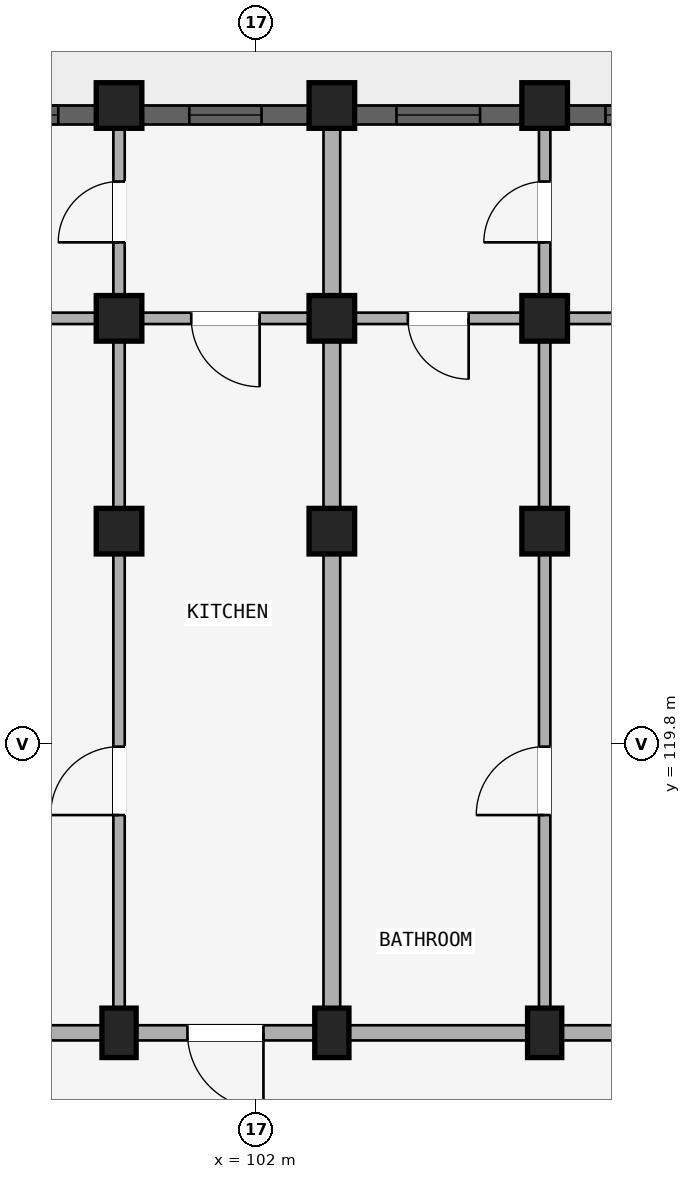
"""IFC4 building model, lengths in metres.
Left out: names, types, materials, properties, quantities, classifications, styles, units other than length and angle.
Written with IfcOpenShell. Run it as: python <this file> out.ifc"""

import sys

from ifc_helpers import new_model, si_unit, direction, frame, frame_2d, origin, origin_2d, place, context, subcontext, project, spatial, rectangle, extrude, element, fill, save


model = new_model("IFC4")
c1 = context("Model", 3, precision=1e-05, world=origin(), true_north=direction((0.0, 1.0)))
c2 = subcontext(c1, "Body", "Model", "MODEL_VIEW")
j1 = project(units=[si_unit("LENGTHUNIT", "METRE"), si_unit("PLANEANGLEUNIT", "RADIAN")], contexts=[c1])
p1 = place(None, origin())
s1 = spatial("IfcSite", under=j1, at=p1, CompositionType="ELEMENT")
p2 = place(p1, origin())
s2 = spatial("IfcBuilding", under=s1, at=p2, CompositionType="ELEMENT")
p3 = place(p2, frame((0.0, 0.0, 33.9)))
s3 = spatial("IfcBuildingStorey", under=s2, at=p3, CompositionType="ELEMENT", Elevation=33.9)
p4 = place(p3, frame((105.8, 116.0, 0.0), z_axis=(0.0, 0.0, 1.0), x_axis=(1.0, 0.0, 0.0)))
e1 = element("IfcColumn", 1, at=p4, inside=s3, PredefinedType="COLUMN", context=c2, shape_type="SweptSolid", body=[
    extrude(rectangle(XDim=0.45, YDim=0.65, at=origin_2d()), origin(), (0.0, 0.0, 1.0), 2.93),
])
for number, where, z_axis, x_axis in (
    (2, (105.8, 122.6, 0.0), (0.0, 0.0, 1.0), (1.0, 0.0, 0.0)),
    (3, (105.8, 125.4, 0.0), (0.0, 0.0, 1.0), (1.0, 0.0, 0.0)),
):
    element("IfcColumn", number, at=place(p3, frame(where, z_axis=z_axis, x_axis=x_axis)), inside=s3, PredefinedType="COLUMN", context=c2, shape_type="SweptSolid", body=[
        extrude(rectangle(XDim=0.6, YDim=0.6, at=origin_2d()), origin(), (0.0, 0.0, 1.0), 2.93),
    ])
p5 = place(p3, frame((105.8, 128.2, 0.0), z_axis=(0.0, 0.0, 1.0), x_axis=(1.0, 0.0, 0.0)))
e4 = element("IfcColumn", 4, at=p5, inside=s3, PredefinedType="COLUMN", context=c2, shape_type="SweptSolid", body=[
    extrude(rectangle(XDim=0.6, YDim=0.6, at=origin_2d()), origin(), (0.0, 0.0, 1.0), 2.97),
])
p6 = place(p3, frame((103.0, 116.0, 0.0), z_axis=(0.0, 0.0, 1.0), x_axis=(1.0, 0.0, 0.0)))
e5 = element("IfcColumn", 5, at=p6, inside=s3, PredefinedType="COLUMN", context=c2, shape_type="SweptSolid", body=[
    extrude(rectangle(XDim=0.45, YDim=0.65, at=origin_2d()), origin(), (0.0, 0.0, 1.0), 2.93),
])
for number, where, z_axis, x_axis in (
    (6, (103.0, 122.6, 0.0), (0.0, 0.0, 1.0), (1.0, 0.0, 0.0)),
    (7, (103.0, 125.4, 0.0), (0.0, 0.0, 1.0), (1.0, 0.0, 0.0)),
):
    element("IfcColumn", number, at=place(p3, frame(where, z_axis=z_axis, x_axis=x_axis)), inside=s3, PredefinedType="COLUMN", context=c2, shape_type="SweptSolid", body=[
        extrude(rectangle(XDim=0.6, YDim=0.6, at=origin_2d()), origin(), (0.0, 0.0, 1.0), 2.93),
    ])
p7 = place(p3, frame((103.0, 128.2, 0.0), z_axis=(0.0, 0.0, 1.0), x_axis=(1.0, 0.0, 0.0)))
e8 = element("IfcColumn", 8, at=p7, inside=s3, PredefinedType="COLUMN", context=c2, shape_type="SweptSolid", body=[
    extrude(rectangle(XDim=0.6, YDim=0.6, at=origin_2d()), origin(), (0.0, 0.0, 1.0), 2.97),
])
p8 = place(p3, frame((100.2, 116.0, 0.0), z_axis=(0.0, 0.0, 1.0), x_axis=(1.0, 0.0, 0.0)))
e9 = element("IfcColumn", 9, at=p8, inside=s3, PredefinedType="COLUMN", context=c2, shape_type="SweptSolid", body=[
    extrude(rectangle(XDim=0.45, YDim=0.65, at=origin_2d()), origin(), (0.0, 0.0, 1.0), 2.93),
])
for number, where, z_axis, x_axis in (
    (10, (100.2, 122.6, 0.0), (0.0, 0.0, 1.0), (1.0, 0.0, 0.0)),
    (11, (100.2, 125.4, 0.0), (0.0, 0.0, 1.0), (1.0, 0.0, 0.0)),
):
    element("IfcColumn", number, at=place(p3, frame(where, z_axis=z_axis, x_axis=x_axis)), inside=s3, PredefinedType="COLUMN", context=c2, shape_type="SweptSolid", body=[
        extrude(rectangle(XDim=0.6, YDim=0.6, at=origin_2d()), origin(), (0.0, 0.0, 1.0), 2.93),
    ])
p9 = place(p3, frame((100.2, 128.2, 0.0), z_axis=(0.0, 0.0, 1.0), x_axis=(1.0, 0.0, 0.0)))
e12 = element("IfcColumn", 12, at=p9, inside=s3, PredefinedType="COLUMN", context=c2, shape_type="SweptSolid", body=[
    extrude(rectangle(XDim=0.6, YDim=0.6, at=origin_2d()), origin(), (0.0, 0.0, 1.0), 2.97),
])
p10 = place(p3, frame((108.6, 116.0, 0.0), z_axis=(0.0, 0.0, 1.0), x_axis=(-1.0, 0.0, 0.0)))
e13 = element("IfcWall", 13, at=p10, inside=s3, PredefinedType="STANDARD", context=c2, shape_type="SweptSolid", body=[
    extrude(rectangle(XDim=2.8, YDim=0.2, at=frame_2d((1.4, 0.0))), origin(), (0.0, 0.0, 1.0), 2.372),
])
p11 = place(p10, frame((0.9, 0.0, 0.0)))
e14 = element("IfcOpeningElement", 14, at=p11, cuts=e13, PredefinedType="OPENING", context=c2, shape_type="SweptSolid", body=[
    extrude(rectangle(XDim=1.0, YDim=2.15, at=frame_2d((0.5, 1.075))), frame((0.0, 0.11, 0.0), z_axis=(0.0, -1.0, 0.0), x_axis=(1.0, 0.0, 0.0)), (0.0, 0.0, 1.0), 0.22),
])
p12 = place(p3, frame((108.52, 125.4, 0.0), z_axis=(0.0, 0.0, 1.0), x_axis=(-1.0, 0.0, 0.0)))
e15 = element("IfcWall", 15, at=p12, inside=s3, PredefinedType="PLUMBINGWALL", context=c2, shape_type="SweptSolid", body=[
    extrude(rectangle(XDim=2.64, YDim=0.15, at=frame_2d((1.32, 0.0))), origin(), (0.0, 0.0, 1.0), 2.372),
])
p13 = place(p12, frame((0.87, 0.0, 0.0)))
e16 = element("IfcOpeningElement", 16, at=p13, cuts=e15, PredefinedType="OPENING", context=c2, shape_type="SweptSolid", body=[
    extrude(rectangle(XDim=0.9, YDim=2.1, at=frame_2d((0.45, 1.05))), frame((0.0, 0.085, 0.0), z_axis=(0.0, -1.0, 0.0), x_axis=(1.0, 0.0, 0.0)), (0.0, 0.0, 1.0), 0.17),
])
p14 = place(p3, frame((105.8, 116.0, 0.0), z_axis=(0.0, 0.0, 1.0), x_axis=(-1.0, 0.0, 0.0)))
e17 = element("IfcWall", 17, at=p14, inside=s3, PredefinedType="STANDARD", context=c2, shape_type="SweptSolid", body=[
    extrude(rectangle(XDim=2.8, YDim=0.2, at=frame_2d((1.4, 0.0))), origin(), (0.0, 0.0, 1.0), 2.372),
])
p15 = place(p3, frame((105.72, 125.4, 0.0), z_axis=(0.0, 0.0, 1.0), x_axis=(-1.0, 0.0, 0.0)))
e18 = element("IfcWall", 18, at=p15, inside=s3, PredefinedType="PLUMBINGWALL", context=c2, shape_type="SweptSolid", body=[
    extrude(rectangle(XDim=2.64, YDim=0.15, at=frame_2d((1.32, 0.0))), origin(), (0.0, 0.0, 1.0), 2.372),
])
p16 = place(p15, frame((0.92, 0.0, 0.0)))
e19 = element("IfcOpeningElement", 19, at=p16, cuts=e18, PredefinedType="OPENING", context=c2, shape_type="SweptSolid", body=[
    extrude(rectangle(XDim=0.8, YDim=2.1, at=frame_2d((0.4, 1.05))), frame((0.0, 0.085, 0.0), z_axis=(0.0, -1.0, 0.0), x_axis=(1.0, 0.0, 0.0)), (0.0, 0.0, 1.0), 0.17),
])
p17 = place(p3, frame((103.0, 116.0, 0.0), z_axis=(0.0, 0.0, 1.0), x_axis=(-1.0, 0.0, 0.0)))
e20 = element("IfcWall", 20, at=p17, inside=s3, PredefinedType="STANDARD", context=c2, shape_type="SweptSolid", body=[
    extrude(rectangle(XDim=2.8, YDim=0.2, at=frame_2d((1.4, 0.0))), origin(), (0.0, 0.0, 1.0), 2.372),
])
p18 = place(p17, frame((0.9, 0.0, 0.0)))
e21 = element("IfcOpeningElement", 21, at=p18, cuts=e20, PredefinedType="OPENING", context=c2, shape_type="SweptSolid", body=[
    extrude(rectangle(XDim=1.0, YDim=2.15, at=frame_2d((0.5, 1.075))), frame((0.0, 0.11, 0.0), z_axis=(0.0, -1.0, 0.0), x_axis=(1.0, 0.0, 0.0)), (0.0, 0.0, 1.0), 0.22),
])
p19 = place(p3, frame((102.92, 125.4, 0.0), z_axis=(0.0, 0.0, 1.0), x_axis=(-1.0, 0.0, 0.0)))
e22 = element("IfcWall", 22, at=p19, inside=s3, PredefinedType="PLUMBINGWALL", context=c2, shape_type="SweptSolid", body=[
    extrude(rectangle(XDim=2.64, YDim=0.15, at=frame_2d((1.32, 0.0))), origin(), (0.0, 0.0, 1.0), 2.372),
])
p20 = place(p19, frame((0.87, 0.0, 0.0)))
e23 = element("IfcOpeningElement", 23, at=p20, cuts=e22, PredefinedType="OPENING", context=c2, shape_type="SweptSolid", body=[
    extrude(rectangle(XDim=0.9, YDim=2.1, at=frame_2d((0.45, 1.05))), frame((0.0, 0.085, 0.0), z_axis=(0.0, -1.0, 0.0), x_axis=(1.0, 0.0, 0.0)), (0.0, 0.0, 1.0), 0.17),
])
p21 = place(p3, frame((100.2, 116.0, 0.0), z_axis=(0.0, 0.0, 1.0), x_axis=(-1.0, 0.0, 0.0)))
e24 = element("IfcWall", 24, at=p21, inside=s3, PredefinedType="STANDARD", context=c2, shape_type="SweptSolid", body=[
    extrude(rectangle(XDim=2.8, YDim=0.2, at=frame_2d((1.4, 0.0))), origin(), (0.0, 0.0, 1.0), 2.372),
])
p22 = place(p3, frame((100.12, 125.4, 0.0), z_axis=(0.0, 0.0, 1.0), x_axis=(-1.0, 0.0, 0.0)))
e25 = element("IfcWall", 25, at=p22, inside=s3, PredefinedType="PLUMBINGWALL", context=c2, shape_type="SweptSolid", body=[
    extrude(rectangle(XDim=2.64, YDim=0.15, at=frame_2d((1.32, 0.0))), origin(), (0.0, 0.0, 1.0), 2.372),
])
p23 = place(p22, frame((0.92, 0.0, 0.0)))
e26 = element("IfcOpeningElement", 26, at=p23, cuts=e25, PredefinedType="OPENING", context=c2, shape_type="SweptSolid", body=[
    extrude(rectangle(XDim=0.8, YDim=2.1, at=frame_2d((0.4, 1.05))), frame((0.0, 0.085, 0.0), z_axis=(0.0, -1.0, 0.0), x_axis=(1.0, 0.0, 0.0)), (0.0, 0.0, 1.0), 0.17),
])
p24 = place(p3, frame((105.8, 116.05, 0.0), z_axis=(0.0, 0.0, 1.0), x_axis=(0.0, 1.0, 0.0)))
e27 = element("IfcWall", 27, at=p24, inside=s3, PredefinedType="PARTITIONING", context=c2, shape_type="SweptSolid", body=[
    extrude(rectangle(XDim=6.53, YDim=0.15, at=frame_2d((3.265, 0.0))), origin(), (0.0, 0.0, 1.0), 2.372),
])
p25 = place(p24, frame((2.815, 0.0, 0.0)))
e28 = element("IfcOpeningElement", 28, at=p25, cuts=e27, PredefinedType="OPENING", context=c2, shape_type="SweptSolid", body=[
    extrude(rectangle(XDim=0.9, YDim=2.1, at=frame_2d((0.45, 1.05))), frame((0.0, 0.085, 0.0), z_axis=(0.0, -1.0, 0.0), x_axis=(1.0, 0.0, 0.0)), (0.0, 0.0, 1.0), 0.17),
])
p26 = place(p3, frame((105.8, 122.7, 0.0), z_axis=(0.0, 0.0, 1.0), x_axis=(0.0, 1.0, 0.0)))
e29 = element("IfcWall", 29, at=p26, inside=s3, PredefinedType="PARTITIONING", context=c2, shape_type="SweptSolid", body=[
    extrude(rectangle(XDim=5.22, YDim=0.15, at=frame_2d((2.61, 0.0))), origin(), (0.0, 0.0, 1.0), 2.372),
])
p27 = place(p26, frame((3.7, 0.0, 0.0)))
e30 = element("IfcOpeningElement", 30, at=p27, cuts=e29, PredefinedType="OPENING", context=c2, shape_type="SweptSolid", body=[
    extrude(rectangle(XDim=0.8, YDim=2.1, at=frame_2d((0.4, 1.05))), frame((0.0, 0.085, 0.0), z_axis=(0.0, -1.0, 0.0), x_axis=(1.0, 0.0, 0.0)), (0.0, 0.0, 1.0), 0.17),
])
p28 = place(p3, frame((103.0, 116.05, 0.0), z_axis=(0.0, 0.0, 1.0), x_axis=(0.0, 1.0, 0.0)))
e31 = element("IfcWall", 31, at=p28, inside=s3, PredefinedType="STANDARD", context=c2, shape_type="SweptSolid", body=[
    extrude(rectangle(XDim=6.53, YDim=0.22, at=frame_2d((3.265, 0.0))), origin(), (0.0, 0.0, 1.0), 2.372),
])
p29 = place(p3, frame((103.0, 122.7, 0.0), z_axis=(0.0, 0.0, 1.0), x_axis=(0.0, 1.0, 0.0)))
e32 = element("IfcWall", 32, at=p29, inside=s3, PredefinedType="STANDARD", context=c2, shape_type="SweptSolid", body=[
    extrude(rectangle(XDim=5.22, YDim=0.22, at=frame_2d((2.61, 0.0))), origin(), (0.0, 0.0, 1.0), 2.372),
])
p30 = place(p3, frame((100.2, 116.05, 0.0), z_axis=(0.0, 0.0, 1.0), x_axis=(0.0, 1.0, 0.0)))
e33 = element("IfcWall", 33, at=p30, inside=s3, PredefinedType="PARTITIONING", context=c2, shape_type="SweptSolid", body=[
    extrude(rectangle(XDim=6.53, YDim=0.15, at=frame_2d((3.265, 0.0))), origin(), (0.0, 0.0, 1.0), 2.372),
])
p31 = place(p30, frame((2.815, 0.0, 0.0)))
e34 = element("IfcOpeningElement", 34, at=p31, cuts=e33, PredefinedType="OPENING", context=c2, shape_type="SweptSolid", body=[
    extrude(rectangle(XDim=0.9, YDim=2.1, at=frame_2d((0.45, 1.05))), frame((0.0, 0.085, 0.0), z_axis=(0.0, -1.0, 0.0), x_axis=(1.0, 0.0, 0.0)), (0.0, 0.0, 1.0), 0.17),
])
p32 = place(p3, frame((100.2, 122.7, 0.0), z_axis=(0.0, 0.0, 1.0), x_axis=(0.0, 1.0, 0.0)))
e35 = element("IfcWall", 35, at=p32, inside=s3, PredefinedType="PARTITIONING", context=c2, shape_type="SweptSolid", body=[
    extrude(rectangle(XDim=5.22, YDim=0.15, at=frame_2d((2.61, 0.0))), origin(), (0.0, 0.0, 1.0), 2.372),
])
p33 = place(p32, frame((3.7, 0.0, 0.0)))
e36 = element("IfcOpeningElement", 36, at=p33, cuts=e35, PredefinedType="OPENING", context=c2, shape_type="SweptSolid", body=[
    extrude(rectangle(XDim=0.8, YDim=2.1, at=frame_2d((0.4, 1.05))), frame((0.0, 0.085, 0.0), z_axis=(0.0, -1.0, 0.0), x_axis=(1.0, 0.0, 0.0)), (0.0, 0.0, 1.0), 0.17),
])
p34 = place(p3, frame((108.296, 128.075, 0.0), z_axis=(0.0, 0.0, 1.0), x_axis=(-1.0, 0.0, 0.0)))
e37 = element("IfcWall", 37, at=p34, inside=s3, PredefinedType="STANDARD", context=c2, shape_type="SweptSolid", body=[
    extrude(rectangle(XDim=2.193, YDim=0.25, at=frame_2d((1.096, 0.0))), origin(), (0.0, 0.0, 1.0), 2.48),
])
p35 = place(p34, frame((0.497, 0.0, 0.78)))
e38 = element("IfcOpeningElement", 38, at=p35, cuts=e37, PredefinedType="OPENING", context=c2, shape_type="SweptSolid", body=[
    extrude(rectangle(XDim=1.2, YDim=1.5, at=frame_2d((0.6, 0.75))), frame((0.0, 0.135, 0.0), z_axis=(0.0, -1.0, 0.0), x_axis=(1.0, 0.0, 0.0)), (0.0, 0.0, 1.0), 0.27),
])
p36 = place(p3, frame((105.497, 128.075, 0.0), z_axis=(0.0, 0.0, 1.0), x_axis=(-1.0, 0.0, 0.0)))
e39 = element("IfcWall", 39, at=p36, inside=s3, PredefinedType="STANDARD", context=c2, shape_type="SweptSolid", body=[
    extrude(rectangle(XDim=2.193, YDim=0.25, at=frame_2d((1.097, 0.0))), origin(), (0.0, 0.0, 1.0), 2.48),
])
p37 = place(p36, frame((0.546, 0.0, 0.83)))
e40 = element("IfcOpeningElement", 40, at=p37, cuts=e39, PredefinedType="OPENING", context=c2, shape_type="SweptSolid", body=[
    extrude(rectangle(XDim=1.1, YDim=1.45, at=frame_2d((0.55, 0.725))), frame((0.0, 0.135, 0.0), z_axis=(0.0, -1.0, 0.0), x_axis=(1.0, 0.0, 0.0)), (0.0, 0.0, 1.0), 0.27),
])
p38 = place(p3, frame((102.697, 128.075, 0.0), z_axis=(0.0, 0.0, 1.0), x_axis=(-1.0, 0.0, 0.0)))
e41 = element("IfcWall", 41, at=p38, inside=s3, PredefinedType="STANDARD", context=c2, shape_type="SweptSolid", body=[
    extrude(rectangle(XDim=2.193, YDim=0.25, at=frame_2d((1.097, 0.0))), origin(), (0.0, 0.0, 1.0), 2.48),
])
p39 = place(p38, frame((0.622, 0.0, 0.88)))
e42 = element("IfcOpeningElement", 42, at=p39, cuts=e41, PredefinedType="OPENING", context=c2, shape_type="SweptSolid", body=[
    extrude(rectangle(XDim=0.95, YDim=1.35, at=frame_2d((0.475, 0.675))), frame((0.0, 0.135, 0.0), z_axis=(0.0, -1.0, 0.0), x_axis=(1.0, 0.0, 0.0)), (0.0, 0.0, 1.0), 0.27),
])
p40 = place(p3, frame((99.896, 128.075, 0.0), z_axis=(0.0, 0.0, 1.0), x_axis=(-1.0, 0.0, 0.0)))
e43 = element("IfcWall", 43, at=p40, inside=s3, PredefinedType="STANDARD", context=c2, shape_type="SweptSolid", body=[
    extrude(rectangle(XDim=2.193, YDim=0.25, at=frame_2d((1.096, 0.0))), origin(), (0.0, 0.0, 1.0), 2.48),
])
p41 = place(p40, frame((0.497, 0.0, 0.78)))
e44 = element("IfcOpeningElement", 44, at=p41, cuts=e43, PredefinedType="OPENING", context=c2, shape_type="SweptSolid", body=[
    extrude(rectangle(XDim=1.2, YDim=1.5, at=frame_2d((0.6, 0.75))), frame((0.0, 0.135, 0.0), z_axis=(0.0, -1.0, 0.0), x_axis=(1.0, 0.0, 0.0)), (0.0, 0.0, 1.0), 0.27),
])
p42 = place(p35, origin())
e45 = element("IfcWindow", 45, at=p42, inside=s3, PartitioningType="SINGLE_PANEL", PredefinedType="WINDOW", context=c2, shape_type="SweptSolid", body=[
    extrude(rectangle(XDim=1.2, YDim=1.5, at=frame_2d((0.6, 0.75))), frame((0.0, 0.03, 0.0), z_axis=(0.0, -1.0, 0.0), x_axis=(1.0, 0.0, 0.0)), (0.0, 0.0, 1.0), 0.06),
])
fill(e38, e45)
p43 = place(p37, origin())
e46 = element("IfcWindow", 46, at=p43, inside=s3, PartitioningType="SINGLE_PANEL", PredefinedType="WINDOW", context=c2, shape_type="SweptSolid", body=[
    extrude(rectangle(XDim=1.1, YDim=1.45, at=frame_2d((0.55, 0.725))), frame((0.0, 0.03, 0.0), z_axis=(0.0, -1.0, 0.0), x_axis=(1.0, 0.0, 0.0)), (0.0, 0.0, 1.0), 0.06),
])
fill(e40, e46)
p44 = place(p39, origin())
e47 = element("IfcWindow", 47, at=p44, inside=s3, PartitioningType="SINGLE_PANEL", PredefinedType="WINDOW", context=c2, shape_type="SweptSolid", body=[
    extrude(rectangle(XDim=0.95, YDim=1.35, at=frame_2d((0.475, 0.675))), frame((0.0, 0.03, 0.0), z_axis=(0.0, -1.0, 0.0), x_axis=(1.0, 0.0, 0.0)), (0.0, 0.0, 1.0), 0.06),
])
fill(e42, e47)
p45 = place(p41, origin())
e48 = element("IfcWindow", 48, at=p45, inside=s3, PartitioningType="SINGLE_PANEL", PredefinedType="WINDOW", context=c2, shape_type="SweptSolid", body=[
    extrude(rectangle(XDim=1.2, YDim=1.5, at=frame_2d((0.6, 0.75))), frame((0.0, 0.03, 0.0), z_axis=(0.0, -1.0, 0.0), x_axis=(1.0, 0.0, 0.0)), (0.0, 0.0, 1.0), 0.06),
])
fill(e44, e48)
p46 = place(p16, frame((0.8, 0.0, 0.0), z_axis=(0.0, 0.0, 1.0), x_axis=(-1.0, 0.0, 0.0)))
e49 = element("IfcDoor", 49, at=p46, inside=s3, OperationType="SINGLE_SWING_RIGHT", PredefinedType="DOOR", context=c2, shape_type="SweptSolid", body=[
    extrude(rectangle(XDim=0.8, YDim=2.1, at=frame_2d((0.4, 1.05))), frame((0.0, 0.025, 0.0), z_axis=(0.0, -1.0, 0.0), x_axis=(1.0, 0.0, 0.0)), (0.0, 0.0, 1.0), 0.05),
])
fill(e19, e49)
p47 = place(p20, frame((0.9, 0.0, 0.0), z_axis=(0.0, 0.0, 1.0), x_axis=(-1.0, 0.0, 0.0)))
e50 = element("IfcDoor", 50, at=p47, inside=s3, OperationType="SINGLE_SWING_RIGHT", PredefinedType="DOOR", context=c2, shape_type="SweptSolid", body=[
    extrude(rectangle(XDim=0.9, YDim=2.1, at=frame_2d((0.45, 1.05))), frame((0.0, 0.025, 0.0), z_axis=(0.0, -1.0, 0.0), x_axis=(1.0, 0.0, 0.0)), (0.0, 0.0, 1.0), 0.05),
])
fill(e23, e50)
p48 = place(p18, origin())
e51 = element("IfcDoor", 51, at=p48, inside=s3, OperationType="SINGLE_SWING_LEFT", PredefinedType="DOOR", context=c2, shape_type="SweptSolid", body=[
    extrude(rectangle(XDim=1.0, YDim=2.15, at=frame_2d((0.5, 1.075))), frame((0.0, 0.025, 0.0), z_axis=(0.0, -1.0, 0.0), x_axis=(1.0, 0.0, 0.0)), (0.0, 0.0, 1.0), 0.05),
])
fill(e21, e51)
p49 = place(p25, origin())
e52 = element("IfcDoor", 52, at=p49, inside=s3, OperationType="SINGLE_SWING_LEFT", PredefinedType="DOOR", context=c2, shape_type="SweptSolid", body=[
    extrude(rectangle(XDim=0.9, YDim=2.1, at=frame_2d((0.45, 1.05))), frame((0.0, 0.025, 0.0), z_axis=(0.0, -1.0, 0.0), x_axis=(1.0, 0.0, 0.0)), (0.0, 0.0, 1.0), 0.05),
])
fill(e28, e52)
p50 = place(p27, frame((0.8, 0.0, 0.0), z_axis=(0.0, 0.0, 1.0), x_axis=(-1.0, 0.0, 0.0)))
e53 = element("IfcDoor", 53, at=p50, inside=s3, OperationType="SINGLE_SWING_RIGHT", PredefinedType="DOOR", context=c2, shape_type="SweptSolid", body=[
    extrude(rectangle(XDim=0.8, YDim=2.1, at=frame_2d((0.4, 1.05))), frame((0.0, 0.025, 0.0), z_axis=(0.0, -1.0, 0.0), x_axis=(1.0, 0.0, 0.0)), (0.0, 0.0, 1.0), 0.05),
])
fill(e30, e53)
p51 = place(p31, frame((0.9, 0.0, 0.0), z_axis=(0.0, 0.0, 1.0), x_axis=(-1.0, 0.0, 0.0)))
e54 = element("IfcDoor", 54, at=p51, inside=s3, OperationType="SINGLE_SWING_RIGHT", PredefinedType="DOOR", context=c2, shape_type="SweptSolid", body=[
    extrude(rectangle(XDim=0.9, YDim=2.1, at=frame_2d((0.45, 1.05))), frame((0.0, 0.025, 0.0), z_axis=(0.0, -1.0, 0.0), x_axis=(1.0, 0.0, 0.0)), (0.0, 0.0, 1.0), 0.05),
])
fill(e34, e54)
p52 = place(p33, origin())
e55 = element("IfcDoor", 55, at=p52, inside=s3, OperationType="SINGLE_SWING_LEFT", PredefinedType="DOOR", context=c2, shape_type="SweptSolid", body=[
    extrude(rectangle(XDim=0.8, YDim=2.1, at=frame_2d((0.4, 1.05))), frame((0.0, 0.025, 0.0), z_axis=(0.0, -1.0, 0.0), x_axis=(1.0, 0.0, 0.0)), (0.0, 0.0, 1.0), 0.05),
])
fill(e36, e55)
save(model, sys.argv[1])
